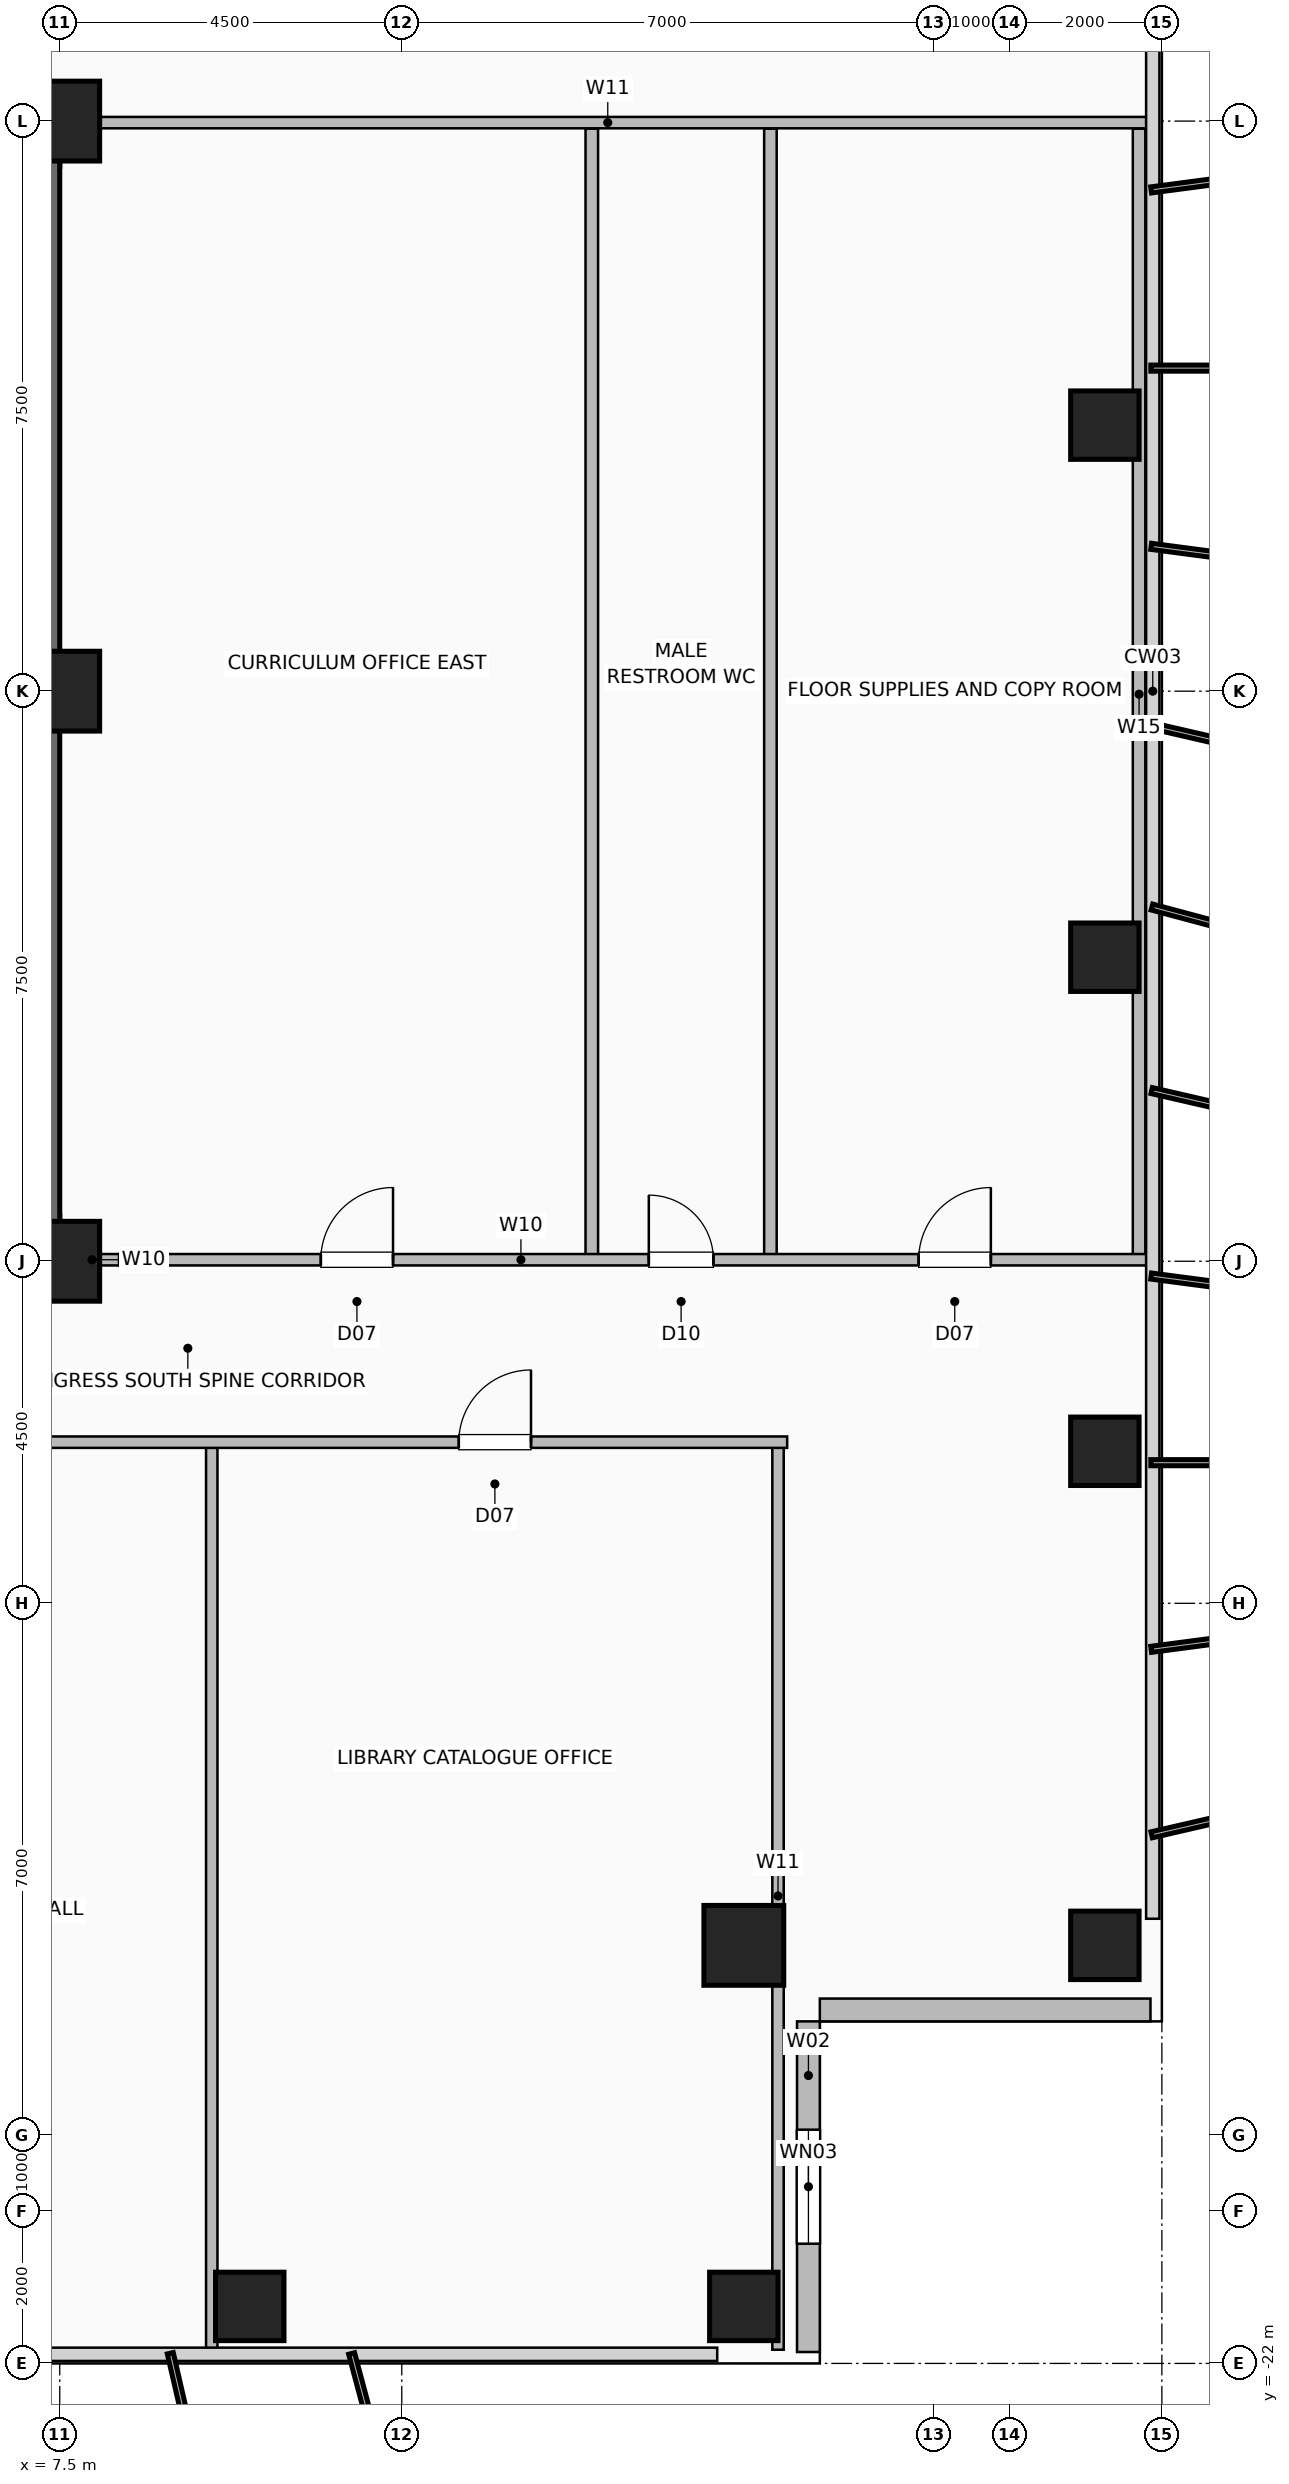
"""IFC4 building model, lengths in metres.
Left out: names, types, materials, properties, quantities, classifications, styles, units other than length and angle.
Written with IfcOpenShell. Run it as: python <this file> out.ifc"""

import sys

from ifc_helpers import new_model, si_unit, direction, frame, frame_2d, origin, origin_2d, place, context, subcontext, project, spatial, rectangle, hollow_rectangle, extrude, element, fill, save


model = new_model("IFC4")
c1 = context("Model", 3, precision=1e-05, world=origin(), true_north=direction((0.0, 1.0)))
c2 = subcontext(c1, "Body", "Model", "MODEL_VIEW")
j1 = project(units=[si_unit("LENGTHUNIT", "METRE"), si_unit("PLANEANGLEUNIT", "RADIAN")], contexts=[c1])
p1 = place(None, origin())
s1 = spatial("IfcSite", under=j1, at=p1, CompositionType="ELEMENT")
p2 = place(p1, origin())
s2 = spatial("IfcBuilding", under=s1, at=p2, CompositionType="ELEMENT")
p3 = place(p2, frame((0.0, 0.0, 137.2)))
s3 = spatial("IfcBuildingStorey", under=s2, at=p3, CompositionType="ELEMENT", Elevation=137.2)
for number, where, z_axis, x_axis in (
    (1, (7.5, -7.5, 0.0), (0.0, 0.0, 1.0), (1.0, 0.0, 0.0)),
    (2, (7.5, 0.0, 0.0), (0.0, 0.0, 1.0), (1.0, 0.0, 0.0)),
    (3, (7.5, 7.5, 0.0), (0.0, 0.0, 1.0), (1.0, 0.0, 0.0)),
):
    element("IfcColumn", number, at=place(p3, frame(where, z_axis=z_axis, x_axis=x_axis)), inside=s3, PredefinedType="COLUMN", context=c2, shape_type="SweptSolid", body=[
        extrude(hollow_rectangle(XDim=1.05, YDim=1.05, WallThickness=0.05, at=origin_2d()), origin(), (0.0, 0.0, 1.0), 3.6),
    ])
for number, where, z_axis, x_axis in (
    (4, (21.25, -16.5, 0.0), (0.0, 0.0, 1.0), (1.0, 0.0, 0.0)),
    (5, (21.25, -10.0, 0.0), (0.0, 0.0, 1.0), (1.0, 0.0, 0.0)),
    (6, (21.25, -3.5, 0.0), (0.0, 0.0, 1.0), (1.0, 0.0, 0.0)),
    (7, (21.25, 3.5, 0.0), (0.0, 0.0, 1.0), (1.0, 0.0, 0.0)),
    (8, (10.0, -21.25, 0.0), (0.0, 0.0, 1.0), (1.0, 0.0, 0.0)),
    (9, (16.5, -21.25, 0.0), (0.0, 0.0, 1.0), (1.0, 0.0, 0.0)),
):
    element("IfcColumn", number, at=place(p3, frame(where, z_axis=z_axis, x_axis=x_axis)), inside=s3, PredefinedType="COLUMN", context=c2, shape_type="SweptSolid", body=[
        extrude(hollow_rectangle(XDim=0.9, YDim=0.9, WallThickness=0.045, at=origin_2d()), origin(), (0.0, 0.0, 1.0), 3.6),
    ])
p4 = place(p3, frame((16.5, -16.5, 0.0), z_axis=(0.0, 0.0, 1.0), x_axis=(1.0, 0.0, 0.0)))
e10 = element("IfcColumn", 10, at=p4, inside=s3, PredefinedType="COLUMN", context=c2, shape_type="SweptSolid", body=[
    extrude(hollow_rectangle(XDim=1.05, YDim=1.05, WallThickness=0.05, at=origin_2d()), origin(), (0.0, 0.0, 1.0), 3.6),
])
p5 = place(p3, frame((17.35, -21.85, 0.0), z_axis=(0.0, 0.0, 1.0), x_axis=(0.0, 1.0, 0.0)))
e11 = element("IfcWall", 11, at=p5, inside=s3, PredefinedType="SOLIDWALL", context=c2, shape_type="SweptSolid", body=[
    extrude(rectangle(XDim=4.35, YDim=0.3, at=frame_2d((2.175, 0.0))), origin(), (0.0, 0.0, 1.0), 3.36),
])
p6 = place(p5, frame((1.425, 0.0, 0.9)))
e12 = element("IfcOpeningElement", 12, at=p6, cuts=e11, PredefinedType="OPENING", context=c2, shape_type="SweptSolid", body=[
    extrude(rectangle(XDim=1.5, YDim=1.8, at=frame_2d((0.75, 0.9))), frame((0.0, 0.16, 0.0), z_axis=(0.0, -1.0, 0.0), x_axis=(1.0, 0.0, 0.0)), (0.0, 0.0, 1.0), 0.32),
])
p7 = place(p3, frame((21.85, -17.35, 0.0), z_axis=(0.0, 0.0, 1.0), x_axis=(-1.0, 0.0, 0.0)))
e13 = element("IfcWall", 13, at=p7, inside=s3, PredefinedType="SOLIDWALL", context=c2, shape_type="SweptSolid", body=[
    extrude(rectangle(XDim=4.35, YDim=0.3, at=frame_2d((2.175, 0.0))), origin(), (0.0, 0.0, 1.0), 3.36),
])
p8 = place(p3, frame((-7.5, -7.2, 0.0), z_axis=(0.0, 0.0, 1.0), x_axis=(1.0, 0.0, 0.0)))
e14 = element("IfcWall", 14, at=p8, inside=s3, PredefinedType="SHEAR", context=c2, shape_type="SweptSolid", body=[
    extrude(rectangle(XDim=15.0, YDim=0.6, at=frame_2d((7.5, 0.0))), origin(), (0.0, 0.0, 1.0), 3.36),
])
p9 = place(p8, frame((1.55, 0.0, 0.0)))
e15 = element("IfcOpeningElement", 15, at=p9, cuts=e14, PredefinedType="OPENING", context=c2, shape_type="SweptSolid", body=[
    extrude(rectangle(XDim=1.05, YDim=2.08, at=frame_2d((0.525, 1.04))), frame((0.0, 0.31, 0.0), z_axis=(0.0, -1.0, 0.0), x_axis=(1.0, 0.0, 0.0)), (0.0, 0.0, 1.0), 0.62),
])
p10 = place(p8, frame((12.4, 0.0, 0.0)))
e16 = element("IfcOpeningElement", 16, at=p10, cuts=e14, PredefinedType="OPENING", context=c2, shape_type="SweptSolid", body=[
    extrude(rectangle(XDim=1.05, YDim=2.08, at=frame_2d((0.525, 1.04))), frame((0.0, 0.31, 0.0), z_axis=(0.0, -1.0, 0.0), x_axis=(1.0, 0.0, 0.0)), (0.0, 0.0, 1.0), 0.62),
])
p11 = place(p8, frame((5.2, 0.0, 0.0)))
e17 = element("IfcOpeningElement", 17, at=p11, cuts=e14, PredefinedType="OPENING", context=c2, shape_type="SweptSolid", body=[
    extrude(rectangle(XDim=1.0, YDim=2.08, at=frame_2d((0.5, 1.04))), frame((0.0, 0.31, 0.0), z_axis=(0.0, -1.0, 0.0), x_axis=(1.0, 0.0, 0.0)), (0.0, 0.0, 1.0), 0.62),
])
p12 = place(p8, frame((8.65, 0.0, 0.0)))
e18 = element("IfcOpeningElement", 18, at=p12, cuts=e14, PredefinedType="OPENING", context=c2, shape_type="SweptSolid", body=[
    extrude(rectangle(XDim=1.0, YDim=2.08, at=frame_2d((0.5, 1.04))), frame((0.0, 0.31, 0.0), z_axis=(0.0, -1.0, 0.0), x_axis=(1.0, 0.0, 0.0)), (0.0, 0.0, 1.0), 0.62),
])
for number, where, z_axis, x_axis in (
    (19, (-7.5, 7.2, 0.0), (0.0, 0.0, 1.0), (1.0, 0.0, 0.0)),
    (20, (7.2, -7.5, 0.0), (0.0, 0.0, 1.0), (0.0, 1.0, 0.0)),
):
    element("IfcWall", number, at=place(p3, frame(where, z_axis=z_axis, x_axis=x_axis)), inside=s3, PredefinedType="SHEAR", context=c2, shape_type="SweptSolid", body=[
        extrude(rectangle(XDim=15.0, YDim=0.6, at=frame_2d((7.5, 0.0))), origin(), (0.0, 0.0, 1.0), 3.36),
    ])
for number, where, z_axis, x_axis in (
    (21, (9.5, -21.82, 0.0), (0.0, 0.0, 1.0), (0.0, 1.0, 0.0)),
    (22, (16.95, -21.82, 0.0), (0.0, 0.0, 1.0), (0.0, 1.0, 0.0)),
):
    element("IfcWall", number, at=place(p3, frame(where, z_axis=z_axis, x_axis=x_axis)), inside=s3, PredefinedType="PARTITIONING", context=c2, shape_type="SweptSolid", body=[
        extrude(rectangle(XDim=11.94, YDim=0.15, at=frame_2d((5.97, 0.0))), origin(), (0.0, 0.0, 1.0), 3.36),
    ])
p13 = place(p3, frame((-17.07, -9.88, 0.0), z_axis=(0.0, 0.0, 1.0), x_axis=(1.0, 0.0, 0.0)))
e23 = element("IfcWall", 23, at=p13, inside=s3, PredefinedType="PARTITIONING", context=c2, shape_type="SweptSolid", body=[
    extrude(rectangle(XDim=34.14, YDim=0.15, at=frame_2d((17.07, 0.0))), origin(), (0.0, 0.0, 1.0), 3.36),
])
p14 = place(p13, frame((3.695, 0.0, 0.0)))
e24 = element("IfcOpeningElement", 24, at=p14, cuts=e23, PredefinedType="OPENING", context=c2, shape_type="SweptSolid", body=[
    extrude(rectangle(XDim=1.8, YDim=2.08, at=frame_2d((0.9, 1.04))), frame((0.0, 0.085, 0.0), z_axis=(0.0, -1.0, 0.0), x_axis=(1.0, 0.0, 0.0)), (0.0, 0.0, 1.0), 0.17),
])
p15 = place(p13, frame((12.92, 0.0, 0.0)))
e25 = element("IfcOpeningElement", 25, at=p15, cuts=e23, PredefinedType="OPENING", context=c2, shape_type="SweptSolid", body=[
    extrude(rectangle(XDim=1.8, YDim=2.08, at=frame_2d((0.9, 1.04))), frame((0.0, 0.085, 0.0), z_axis=(0.0, -1.0, 0.0), x_axis=(1.0, 0.0, 0.0)), (0.0, 0.0, 1.0), 0.17),
])
p16 = place(p13, frame((21.67, 0.0, 0.0)))
e26 = element("IfcOpeningElement", 26, at=p16, cuts=e23, PredefinedType="OPENING", context=c2, shape_type="SweptSolid", body=[
    extrude(rectangle(XDim=1.8, YDim=2.08, at=frame_2d((0.9, 1.04))), frame((0.0, 0.085, 0.0), z_axis=(0.0, -1.0, 0.0), x_axis=(1.0, 0.0, 0.0)), (0.0, 0.0, 1.0), 0.17),
])
p17 = place(p13, frame((29.82, 0.0, 0.0)))
e27 = element("IfcOpeningElement", 27, at=p17, cuts=e23, PredefinedType="OPENING", context=c2, shape_type="SweptSolid", body=[
    extrude(rectangle(XDim=0.95, YDim=2.06, at=frame_2d((0.475, 1.03))), frame((0.0, 0.085, 0.0), z_axis=(0.0, -1.0, 0.0), x_axis=(1.0, 0.0, 0.0)), (0.0, 0.0, 1.0), 0.17),
])
p18 = place(p3, frame((7.45, -7.48, 0.0), z_axis=(0.0, 0.0, 1.0), x_axis=(1.0, 0.0, 0.0)))
e28 = element("IfcWall", 28, at=p18, inside=s3, PredefinedType="PARTITIONING", context=c2, shape_type="SweptSolid", body=[
    extrude(rectangle(XDim=0.95, YDim=0.15, at=frame_2d((0.475, 0.0))), origin(), (0.0, 0.0, 1.0), 3.36),
])
for number, where, z_axis, x_axis in (
    (29, (16.85, -7.48, 0.0), (0.0, 0.0, 1.0), (0.0, 1.0, 0.0)),
    (30, (14.5, -7.48, 0.0), (0.0, 0.0, 1.0), (0.0, 1.0, 0.0)),
    (31, (21.7, -7.48, 0.0), (0.0, 0.0, 1.0), (0.0, 1.0, 0.0)),
):
    element("IfcWall", number, at=place(p3, frame(where, z_axis=z_axis, x_axis=x_axis)), inside=s3, PredefinedType="PLUMBINGWALL", context=c2, shape_type="SweptSolid", body=[
        extrude(rectangle(XDim=14.88, YDim=0.165, at=frame_2d((7.44, 0.0))), origin(), (0.0, 0.0, 1.0), 3.36),
    ])
p19 = place(p3, frame((8.28, -7.48, 0.0), z_axis=(0.0, 0.0, 1.0), x_axis=(1.0, 0.0, 0.0)))
e32 = element("IfcWall", 32, at=p19, inside=s3, PredefinedType="PARTITIONING", context=c2, shape_type="SweptSolid", body=[
    extrude(rectangle(XDim=13.54, YDim=0.15, at=frame_2d((6.77, 0.0))), origin(), (0.0, 0.0, 1.0), 3.36),
])
p20 = place(p19, frame((2.655, 0.0, 0.0)))
e33 = element("IfcOpeningElement", 33, at=p20, cuts=e32, PredefinedType="OPENING", context=c2, shape_type="SweptSolid", body=[
    extrude(rectangle(XDim=0.95, YDim=2.06, at=frame_2d((0.475, 1.03))), frame((0.0, 0.085, 0.0), z_axis=(0.0, -1.0, 0.0), x_axis=(1.0, 0.0, 0.0)), (0.0, 0.0, 1.0), 0.17),
])
p21 = place(p19, frame((6.97, 0.0, 0.0)))
e34 = element("IfcOpeningElement", 34, at=p21, cuts=e32, PredefinedType="OPENING", context=c2, shape_type="SweptSolid", body=[
    extrude(rectangle(XDim=0.85, YDim=2.05, at=frame_2d((0.425, 1.025))), frame((0.0, 0.085, 0.0), z_axis=(0.0, -1.0, 0.0), x_axis=(1.0, 0.0, 0.0)), (0.0, 0.0, 1.0), 0.17),
])
p22 = place(p19, frame((10.52, 0.0, 0.0)))
e35 = element("IfcOpeningElement", 35, at=p22, cuts=e32, PredefinedType="OPENING", context=c2, shape_type="SweptSolid", body=[
    extrude(rectangle(XDim=0.95, YDim=2.06, at=frame_2d((0.475, 1.03))), frame((0.0, 0.085, 0.0), z_axis=(0.0, -1.0, 0.0), x_axis=(1.0, 0.0, 0.0)), (0.0, 0.0, 1.0), 0.17),
])
p23 = place(p3, frame((7.6, 7.48, 0.0), z_axis=(0.0, 0.0, 1.0), x_axis=(1.0, 0.0, 0.0)))
e36 = element("IfcWall", 36, at=p23, inside=s3, PredefinedType="PARTITIONING", context=c2, shape_type="SweptSolid", body=[
    extrude(rectangle(XDim=14.22, YDim=0.15, at=frame_2d((7.11, 0.0))), origin(), (0.0, 0.0, 1.0), 3.36),
])
p24 = place(p6, origin())
e37 = element("IfcWindow", 37, at=p24, inside=s3, PartitioningType="SINGLE_PANEL", PredefinedType="WINDOW", context=c2, shape_type="SweptSolid", body=[
    extrude(rectangle(XDim=1.5, YDim=1.8, at=frame_2d((0.75, 0.9))), frame((0.0, 0.03, 0.0), z_axis=(0.0, -1.0, 0.0), x_axis=(1.0, 0.0, 0.0)), (0.0, 0.0, 1.0), 0.06),
])
fill(e12, e37)
p25 = place(p17, origin())
e38 = element("IfcDoor", 38, at=p25, inside=s3, OperationType="SINGLE_SWING_RIGHT", PredefinedType="DOOR", context=c2, shape_type="SweptSolid", body=[
    extrude(rectangle(XDim=0.95, YDim=2.06, at=frame_2d((0.475, 1.03))), frame((0.0, 0.025, 0.0), z_axis=(0.0, -1.0, 0.0), x_axis=(1.0, 0.0, 0.0)), (0.0, 0.0, 1.0), 0.05),
])
fill(e27, e38)
p26 = place(p20, origin())
e39 = element("IfcDoor", 39, at=p26, inside=s3, OperationType="SINGLE_SWING_RIGHT", PredefinedType="DOOR", context=c2, shape_type="SweptSolid", body=[
    extrude(rectangle(XDim=0.95, YDim=2.06, at=frame_2d((0.475, 1.03))), frame((0.0, 0.025, 0.0), z_axis=(0.0, -1.0, 0.0), x_axis=(1.0, 0.0, 0.0)), (0.0, 0.0, 1.0), 0.05),
])
fill(e33, e39)
p27 = place(p21, origin())
e40 = element("IfcDoor", 40, at=p27, inside=s3, OperationType="SINGLE_SWING_LEFT", PredefinedType="DOOR", context=c2, shape_type="SweptSolid", body=[
    extrude(rectangle(XDim=0.85, YDim=2.05, at=frame_2d((0.425, 1.025))), frame((0.0, 0.025, 0.0), z_axis=(0.0, -1.0, 0.0), x_axis=(1.0, 0.0, 0.0)), (0.0, 0.0, 1.0), 0.05),
])
fill(e34, e40)
p28 = place(p22, origin())
e41 = element("IfcDoor", 41, at=p28, inside=s3, OperationType="SINGLE_SWING_RIGHT", PredefinedType="DOOR", context=c2, shape_type="SweptSolid", body=[
    extrude(rectangle(XDim=0.95, YDim=2.06, at=frame_2d((0.475, 1.03))), frame((0.0, 0.025, 0.0), z_axis=(0.0, -1.0, 0.0), x_axis=(1.0, 0.0, 0.0)), (0.0, 0.0, 1.0), 0.05),
])
fill(e35, e41)
save(model, sys.argv[1])
